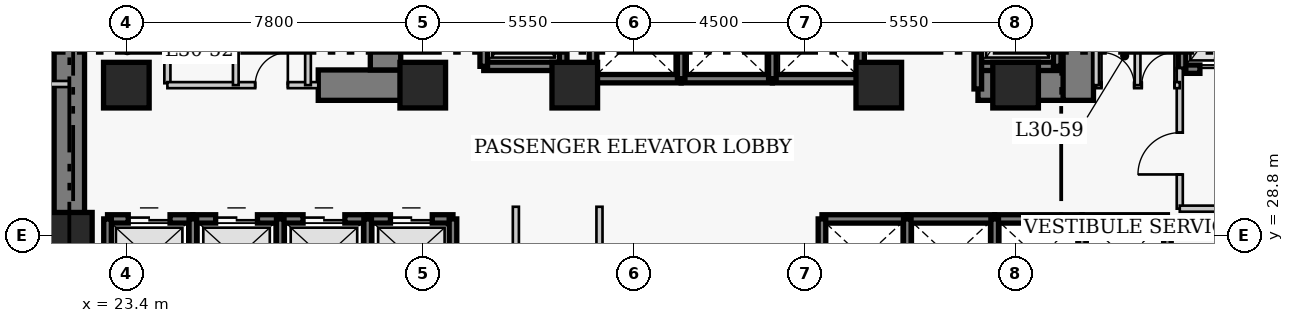
"""IFC4 building model, lengths in metres.
Left out: names, types, materials, properties, quantities, classifications, styles, units other than length and angle.
Written with IfcOpenShell. Run it as: python <this file> out.ifc"""

import sys

from ifc_helpers import new_model, si_unit, direction, frame, frame_2d, origin, origin_2d, place, context, subcontext, project, spatial, rectangle, extrude, element, fill, save


model = new_model("IFC4")
c1 = context("Model", 3, precision=1e-05, world=origin(), true_north=direction((0.0, 1.0)))
c2 = subcontext(c1, "Body", "Model", "MODEL_VIEW")
j1 = project(units=[si_unit("LENGTHUNIT", "METRE"), si_unit("PLANEANGLEUNIT", "RADIAN")], contexts=[c1])
p1 = place(None, origin())
s1 = spatial("IfcSite", under=j1, at=p1, CompositionType="ELEMENT")
p2 = place(p1, origin())
s2 = spatial("IfcBuilding", under=s1, at=p2, CompositionType="ELEMENT")
p3 = place(p2, frame((0.0, 0.0, 122.2)))
s3 = spatial("IfcBuildingStorey", under=s2, at=p3, CompositionType="ELEMENT", Elevation=122.2)
p4 = place(p3, frame((21.9, 27.05, 0.0), z_axis=(0.0, 0.0, 1.0), x_axis=(0.0, 1.0, 0.0)))
e1 = element("IfcWall", 1, at=p4, inside=s3, PredefinedType="SHEAR", context=c2, shape_type="SweptSolid", body=[
    extrude(rectangle(XDim=13.67, YDim=0.8, at=frame_2d((6.835, 0.0))), origin(), (0.0, 0.0, 1.0), 3.8),
])
p5 = place(p3, frame((28.45, 32.75, 0.0), z_axis=(0.0, 0.0, 1.0), x_axis=(1.0, 0.0, 0.0)))
e2 = element("IfcWall", 2, at=p5, inside=s3, PredefinedType="SHEAR", context=c2, shape_type="SweptSolid", body=[
    extrude(rectangle(XDim=2.4, YDim=0.8, at=frame_2d((1.2, 0.0))), origin(), (0.0, 0.0, 1.0), 3.8),
])
p6 = place(p3, frame((45.81, 32.75, 0.0), z_axis=(0.0, 0.0, 1.0), x_axis=(1.0, 0.0, 0.0)))
e3 = element("IfcWall", 3, at=p6, inside=s3, PredefinedType="SHEAR", context=c2, shape_type="SweptSolid", body=[
    extrude(rectangle(XDim=2.64, YDim=0.8, at=frame_2d((1.32, 0.0))), origin(), (0.0, 0.0, 1.0), 3.8),
])
p7 = place(p3, frame((30.22, 33.15, 0.0), z_axis=(0.0, 0.0, 1.0), x_axis=(0.0, 1.0, 0.0)))
e4 = element("IfcWall", 4, at=p7, inside=s3, PredefinedType="SHEAR", context=c2, shape_type="SweptSolid", body=[
    extrude(rectangle(XDim=7.17, YDim=0.8, at=frame_2d((3.585, 0.0))), origin(), (0.0, 0.0, 1.0), 3.8),
])
p8 = place(p3, frame((48.45, 32.35, 0.0), z_axis=(0.0, 0.0, 1.0), x_axis=(0.0, 1.0, 0.0)))
e5 = element("IfcWall", 5, at=p8, inside=s3, PredefinedType="SHEAR", context=c2, shape_type="SweptSolid", body=[
    extrude(rectangle(XDim=7.97, YDim=0.8, at=frame_2d((3.985, 0.0))), origin(), (0.0, 0.0, 1.0), 3.8),
])
p9 = place(p8, frame((5.85, 0.0, 0.0)))
e6 = element("IfcOpeningElement", 6, at=p9, cuts=e5, PredefinedType="OPENING", context=c2, shape_type="SweptSolid", body=[
    extrude(rectangle(XDim=1.1, YDim=2.15, at=frame_2d((0.55, 1.075))), frame((0.0, 0.41, 0.0), z_axis=(0.0, -1.0, 0.0), x_axis=(1.0, 0.0, 0.0)), (0.0, 0.0, 1.0), 0.82),
])
for number, where, z_axis, x_axis in (
    (7, (21.9, 28.8, 0.0), (0.0, 0.0, 1.0), (1.0, 0.0, 0.0)),
    (8, (23.4, 32.75, 0.0), (0.0, 0.0, 1.0), (1.0, 0.0, 0.0)),
    (9, (31.2, 32.75, 0.0), (0.0, 0.0, 1.0), (1.0, 0.0, 0.0)),
    (10, (35.2, 32.75, 0.0), (0.0, 0.0, 1.0), (1.0, 0.0, 0.0)),
    (11, (43.2, 32.75, 0.0), (0.0, 0.0, 1.0), (1.0, 0.0, 0.0)),
    (12, (46.8, 32.75, 0.0), (0.0, 0.0, 1.0), (1.0, 0.0, 0.0)),
):
    element("IfcColumn", number, at=place(p3, frame(where, z_axis=z_axis, x_axis=x_axis)), inside=s3, PredefinedType="COLUMN", context=c2, shape_type="SweptSolid", body=[
        extrude(rectangle(XDim=1.2, YDim=1.2, at=origin_2d()), origin(), (0.0, 0.0, 1.0), 3.8),
    ])
p10 = place(p3, frame((22.905, 29.23, 0.0), z_axis=(0.0, 0.0, 1.0), x_axis=(1.0, 0.0, 0.0)))
e13 = element("IfcWall", 13, at=p10, inside=s3, PredefinedType="SHEAR", context=c2, shape_type="SweptSolid", body=[
    extrude(rectangle(XDim=2.245, YDim=0.22, at=frame_2d((1.123, 0.0))), origin(), (0.0, 0.0, 1.0), 3.8),
])
p11 = place(p10, frame((0.545, 0.0, 0.0)))
e14 = element("IfcOpeningElement", 14, at=p11, cuts=e13, PredefinedType="OPENING", context=c2, shape_type="SweptSolid", body=[
    extrude(rectangle(XDim=1.1, YDim=2.15, at=frame_2d((0.55, 1.075))), frame((0.0, 0.12, 0.0), z_axis=(0.0, -1.0, 0.0), x_axis=(1.0, 0.0, 0.0)), (0.0, 0.0, 1.0), 0.24),
])
p12 = place(p3, frame((22.905, 27.17, 0.0), z_axis=(0.0, 0.0, 1.0), x_axis=(0.0, 1.0, 0.0)))
e15 = element("IfcWall", 15, at=p12, inside=s3, PredefinedType="SHEAR", context=c2, shape_type="SweptSolid", body=[
    extrude(rectangle(XDim=2.06, YDim=0.2, at=frame_2d((1.03, 0.0))), origin(), (0.0, 0.0, 1.0), 3.8),
])
p13 = place(p3, frame((25.15, 29.23, 0.0), z_axis=(0.0, 0.0, 1.0), x_axis=(1.0, 0.0, 0.0)))
e16 = element("IfcWall", 16, at=p13, inside=s3, PredefinedType="SHEAR", context=c2, shape_type="SweptSolid", body=[
    extrude(rectangle(XDim=2.3, YDim=0.22, at=frame_2d((1.15, 0.0))), origin(), (0.0, 0.0, 1.0), 3.8),
])
p14 = place(p13, frame((0.6, 0.0, 0.0)))
e17 = element("IfcOpeningElement", 17, at=p14, cuts=e16, PredefinedType="OPENING", context=c2, shape_type="SweptSolid", body=[
    extrude(rectangle(XDim=1.1, YDim=2.15, at=frame_2d((0.55, 1.075))), frame((0.0, 0.12, 0.0), z_axis=(0.0, -1.0, 0.0), x_axis=(1.0, 0.0, 0.0)), (0.0, 0.0, 1.0), 0.24),
])
p15 = place(p3, frame((25.15, 27.17, 0.0), z_axis=(0.0, 0.0, 1.0), x_axis=(0.0, 1.0, 0.0)))
e18 = element("IfcWall", 18, at=p15, inside=s3, PredefinedType="SHEAR", context=c2, shape_type="SweptSolid", body=[
    extrude(rectangle(XDim=2.06, YDim=0.2, at=frame_2d((1.03, 0.0))), origin(), (0.0, 0.0, 1.0), 3.8),
])
p16 = place(p3, frame((27.45, 29.23, 0.0), z_axis=(0.0, 0.0, 1.0), x_axis=(1.0, 0.0, 0.0)))
e19 = element("IfcWall", 19, at=p16, inside=s3, PredefinedType="SHEAR", context=c2, shape_type="SweptSolid", body=[
    extrude(rectangle(XDim=2.3, YDim=0.22, at=frame_2d((1.15, 0.0))), origin(), (0.0, 0.0, 1.0), 3.8),
])
p17 = place(p16, frame((0.6, 0.0, 0.0)))
e20 = element("IfcOpeningElement", 20, at=p17, cuts=e19, PredefinedType="OPENING", context=c2, shape_type="SweptSolid", body=[
    extrude(rectangle(XDim=1.1, YDim=2.15, at=frame_2d((0.55, 1.075))), frame((0.0, 0.12, 0.0), z_axis=(0.0, -1.0, 0.0), x_axis=(1.0, 0.0, 0.0)), (0.0, 0.0, 1.0), 0.24),
])
p18 = place(p3, frame((27.45, 27.17, 0.0), z_axis=(0.0, 0.0, 1.0), x_axis=(0.0, 1.0, 0.0)))
e21 = element("IfcWall", 21, at=p18, inside=s3, PredefinedType="SHEAR", context=c2, shape_type="SweptSolid", body=[
    extrude(rectangle(XDim=2.06, YDim=0.2, at=frame_2d((1.03, 0.0))), origin(), (0.0, 0.0, 1.0), 3.8),
])
p19 = place(p3, frame((29.75, 29.23, 0.0), z_axis=(0.0, 0.0, 1.0), x_axis=(1.0, 0.0, 0.0)))
e22 = element("IfcWall", 22, at=p19, inside=s3, PredefinedType="SHEAR", context=c2, shape_type="SweptSolid", body=[
    extrude(rectangle(XDim=2.245, YDim=0.22, at=frame_2d((1.123, 0.0))), origin(), (0.0, 0.0, 1.0), 3.8),
])
p20 = place(p19, frame((0.6, 0.0, 0.0)))
e23 = element("IfcOpeningElement", 23, at=p20, cuts=e22, PredefinedType="OPENING", context=c2, shape_type="SweptSolid", body=[
    extrude(rectangle(XDim=1.1, YDim=2.15, at=frame_2d((0.55, 1.075))), frame((0.0, 0.12, 0.0), z_axis=(0.0, -1.0, 0.0), x_axis=(1.0, 0.0, 0.0)), (0.0, 0.0, 1.0), 0.24),
])
for number, where, z_axis, x_axis in (
    (24, (29.75, 27.17, 0.0), (0.0, 0.0, 1.0), (0.0, 1.0, 0.0)),
    (25, (31.995, 27.17, 0.0), (0.0, 0.0, 1.0), (0.0, 1.0, 0.0)),
):
    element("IfcWall", number, at=place(p3, frame(where, z_axis=z_axis, x_axis=x_axis)), inside=s3, PredefinedType="SHEAR", context=c2, shape_type="SweptSolid", body=[
        extrude(rectangle(XDim=2.06, YDim=0.2, at=frame_2d((1.03, 0.0))), origin(), (0.0, 0.0, 1.0), 3.8),
    ])
p21 = place(p3, frame((41.705, 29.23, 0.0), z_axis=(0.0, 0.0, 1.0), x_axis=(1.0, 0.0, 0.0)))
e26 = element("IfcWall", 26, at=p21, inside=s3, PredefinedType="SHEAR", context=c2, shape_type="SweptSolid", body=[
    extrude(rectangle(XDim=2.245, YDim=0.22, at=frame_2d((1.123, 0.0))), origin(), (0.0, 0.0, 1.0), 3.8),
])
p22 = place(p3, frame((41.705, 27.17, 0.0), z_axis=(0.0, 0.0, 1.0), x_axis=(0.0, 1.0, 0.0)))
e27 = element("IfcWall", 27, at=p22, inside=s3, PredefinedType="SHEAR", context=c2, shape_type="SweptSolid", body=[
    extrude(rectangle(XDim=2.06, YDim=0.2, at=frame_2d((1.03, 0.0))), origin(), (0.0, 0.0, 1.0), 3.8),
])
p23 = place(p3, frame((43.95, 29.23, 0.0), z_axis=(0.0, 0.0, 1.0), x_axis=(1.0, 0.0, 0.0)))
e28 = element("IfcWall", 28, at=p23, inside=s3, PredefinedType="SHEAR", context=c2, shape_type="SweptSolid", body=[
    extrude(rectangle(XDim=2.3, YDim=0.22, at=frame_2d((1.15, 0.0))), origin(), (0.0, 0.0, 1.0), 3.8),
])
p24 = place(p3, frame((43.95, 27.17, 0.0), z_axis=(0.0, 0.0, 1.0), x_axis=(0.0, 1.0, 0.0)))
e29 = element("IfcWall", 29, at=p24, inside=s3, PredefinedType="SHEAR", context=c2, shape_type="SweptSolid", body=[
    extrude(rectangle(XDim=2.06, YDim=0.2, at=frame_2d((1.03, 0.0))), origin(), (0.0, 0.0, 1.0), 3.8),
])
p25 = place(p3, frame((46.25, 29.23, 0.0), z_axis=(0.0, 0.0, 1.0), x_axis=(1.0, 0.0, 0.0)))
e30 = element("IfcWall", 30, at=p25, inside=s3, PredefinedType="SHEAR", context=c2, shape_type="SweptSolid", body=[
    extrude(rectangle(XDim=2.3, YDim=0.22, at=frame_2d((1.15, 0.0))), origin(), (0.0, 0.0, 1.0), 3.8),
])
p26 = place(p3, frame((46.25, 27.17, 0.0), z_axis=(0.0, 0.0, 1.0), x_axis=(0.0, 1.0, 0.0)))
e31 = element("IfcWall", 31, at=p26, inside=s3, PredefinedType="SHEAR", context=c2, shape_type="SweptSolid", body=[
    extrude(rectangle(XDim=2.06, YDim=0.2, at=frame_2d((1.03, 0.0))), origin(), (0.0, 0.0, 1.0), 3.8),
])
p27 = place(p3, frame((48.55, 29.23, 0.0), z_axis=(0.0, 0.0, 1.0), x_axis=(1.0, 0.0, 0.0)))
e32 = element("IfcWall", 32, at=p27, inside=s3, PredefinedType="SHEAR", context=c2, shape_type="SweptSolid", body=[
    extrude(rectangle(XDim=2.245, YDim=0.22, at=frame_2d((1.123, 0.0))), origin(), (0.0, 0.0, 1.0), 3.8),
])
for number, where, z_axis, x_axis in (
    (33, (48.55, 27.17, 0.0), (0.0, 0.0, 1.0), (0.0, 1.0, 0.0)),
    (34, (50.795, 27.17, 0.0), (0.0, 0.0, 1.0), (0.0, 1.0, 0.0)),
):
    element("IfcWall", number, at=place(p3, frame(where, z_axis=z_axis, x_axis=x_axis)), inside=s3, PredefinedType="SHEAR", context=c2, shape_type="SweptSolid", body=[
        extrude(rectangle(XDim=2.06, YDim=0.2, at=frame_2d((1.03, 0.0))), origin(), (0.0, 0.0, 1.0), 3.8),
    ])
p28 = place(p3, frame((35.68, 32.92, 0.0), z_axis=(0.0, 0.0, 1.0), x_axis=(1.0, 0.0, 0.0)))
e35 = element("IfcWall", 35, at=p28, inside=s3, PredefinedType="SHEAR", context=c2, shape_type="SweptSolid", body=[
    extrude(rectangle(XDim=2.32, YDim=0.22, at=frame_2d((1.16, 0.0))), origin(), (0.0, 0.0, 1.0), 3.8),
])
p29 = place(p3, frame((35.68, 32.92, 0.0), z_axis=(0.0, 0.0, 1.0), x_axis=(0.0, 1.0, 0.0)))
e36 = element("IfcWall", 36, at=p29, inside=s3, PredefinedType="SHEAR", context=c2, shape_type="SweptSolid", body=[
    extrude(rectangle(XDim=2.16, YDim=0.2, at=frame_2d((1.08, 0.0))), origin(), (0.0, 0.0, 1.0), 3.8),
])
p30 = place(p3, frame((38.0, 32.92, 0.0), z_axis=(0.0, 0.0, 1.0), x_axis=(1.0, 0.0, 0.0)))
e37 = element("IfcWall", 37, at=p30, inside=s3, PredefinedType="SHEAR", context=c2, shape_type="SweptSolid", body=[
    extrude(rectangle(XDim=2.4, YDim=0.22, at=frame_2d((1.2, 0.0))), origin(), (0.0, 0.0, 1.0), 3.8),
])
p31 = place(p3, frame((38.0, 32.92, 0.0), z_axis=(0.0, 0.0, 1.0), x_axis=(0.0, 1.0, 0.0)))
e38 = element("IfcWall", 38, at=p31, inside=s3, PredefinedType="SHEAR", context=c2, shape_type="SweptSolid", body=[
    extrude(rectangle(XDim=2.16, YDim=0.2, at=frame_2d((1.08, 0.0))), origin(), (0.0, 0.0, 1.0), 3.8),
])
p32 = place(p3, frame((40.4, 32.92, 0.0), z_axis=(0.0, 0.0, 1.0), x_axis=(1.0, 0.0, 0.0)))
e39 = element("IfcWall", 39, at=p32, inside=s3, PredefinedType="SHEAR", context=c2, shape_type="SweptSolid", body=[
    extrude(rectangle(XDim=2.32, YDim=0.22, at=frame_2d((1.16, 0.0))), origin(), (0.0, 0.0, 1.0), 3.8),
])
for number, where, z_axis, x_axis in (
    (40, (40.4, 32.92, 0.0), (0.0, 0.0, 1.0), (0.0, 1.0, 0.0)),
    (41, (42.72, 32.92, 0.0), (0.0, 0.0, 1.0), (0.0, 1.0, 0.0)),
):
    element("IfcWall", number, at=place(p3, frame(where, z_axis=z_axis, x_axis=x_axis)), inside=s3, PredefinedType="SHEAR", context=c2, shape_type="SweptSolid", body=[
        extrude(rectangle(XDim=2.16, YDim=0.2, at=frame_2d((1.08, 0.0))), origin(), (0.0, 0.0, 1.0), 3.8),
    ])
p33 = place(p3, frame((51.18, 33.17, 0.0), z_axis=(0.0, 0.0, 1.0), x_axis=(1.0, 0.0, 0.0)))
e42 = element("IfcWall", 42, at=p33, inside=s3, PredefinedType="SHEAR", context=c2, shape_type="SweptSolid", body=[
    extrude(rectangle(XDim=2.42, YDim=0.22, at=frame_2d((1.21, 0.0))), origin(), (0.0, 0.0, 1.0), 3.8),
])
p34 = place(p33, frame((0.47, 0.0, 0.0)))
e43 = element("IfcOpeningElement", 43, at=p34, cuts=e42, PredefinedType="OPENING", context=c2, shape_type="SweptSolid", body=[
    extrude(rectangle(XDim=1.3, YDim=2.15, at=frame_2d((0.65, 1.075))), frame((0.0, 0.12, 0.0), z_axis=(0.0, -1.0, 0.0), x_axis=(1.0, 0.0, 0.0)), (0.0, 0.0, 1.0), 0.24),
])
p35 = place(p3, frame((51.18, 33.17, 0.0), z_axis=(0.0, 0.0, 1.0), x_axis=(0.0, 1.0, 0.0)))
e44 = element("IfcWall", 44, at=p35, inside=s3, PredefinedType="SHEAR", context=c2, shape_type="SweptSolid", body=[
    extrude(rectangle(XDim=2.86, YDim=0.2, at=frame_2d((1.43, 0.0))), origin(), (0.0, 0.0, 1.0), 3.8),
])
p36 = place(p3, frame((32.805, 33.245, 0.0), z_axis=(0.0, 0.0, 1.0), x_axis=(1.0, 0.0, 0.0)))
e45 = element("IfcWall", 45, at=p36, inside=s3, PredefinedType="SHEAR", context=c2, shape_type="SweptSolid", body=[
    extrude(rectangle(XDim=2.09, YDim=0.22, at=frame_2d((1.045, 0.0))), origin(), (0.0, 0.0, 1.0), 3.8),
])
for number, where, z_axis, x_axis in (
    (46, (32.805, 33.245, 0.0), (0.0, 0.0, 1.0), (0.0, 1.0, 0.0)),
    (47, (34.895, 33.245, 0.0), (0.0, 0.0, 1.0), (0.0, 1.0, 0.0)),
):
    element("IfcWall", number, at=place(p3, frame(where, z_axis=z_axis, x_axis=x_axis)), inside=s3, PredefinedType="SHEAR", context=c2, shape_type="SweptSolid", body=[
        extrude(rectangle(XDim=2.91, YDim=0.2, at=frame_2d((1.455, 0.0))), origin(), (0.0, 0.0, 1.0), 3.8),
    ])
p37 = place(p3, frame((45.805, 33.245, 0.0), z_axis=(0.0, 0.0, 1.0), x_axis=(1.0, 0.0, 0.0)))
e48 = element("IfcWall", 48, at=p37, inside=s3, PredefinedType="SHEAR", context=c2, shape_type="SweptSolid", body=[
    extrude(rectangle(XDim=2.09, YDim=0.22, at=frame_2d((1.045, 0.0))), origin(), (0.0, 0.0, 1.0), 3.8),
])
p38 = place(p3, frame((45.805, 32.65, 0.0), z_axis=(0.0, 0.0, 1.0), x_axis=(0.0, 1.0, 0.0)))
e49 = element("IfcWall", 49, at=p38, inside=s3, PredefinedType="SHEAR", context=c2, shape_type="SweptSolid", body=[
    extrude(rectangle(XDim=3.505, YDim=0.2, at=frame_2d((1.752, 0.0))), origin(), (0.0, 0.0, 1.0), 3.8),
])
p39 = place(p3, frame((47.895, 33.245, 0.0), z_axis=(0.0, 0.0, 1.0), x_axis=(0.0, 1.0, 0.0)))
e50 = element("IfcWall", 50, at=p39, inside=s3, PredefinedType="SHEAR", context=c2, shape_type="SweptSolid", body=[
    extrude(rectangle(XDim=2.91, YDim=0.2, at=frame_2d((1.455, 0.0))), origin(), (0.0, 0.0, 1.0), 3.8),
])
p40 = place(p3, frame((24.48, 32.8, 0.0), z_axis=(0.0, 0.0, 1.0), x_axis=(0.0, 1.0, 0.0)))
e51 = element("IfcWall", 51, at=p40, inside=s3, PredefinedType="PARTITIONING", context=c2, shape_type="SweptSolid", body=[
    extrude(rectangle(XDim=3.57, YDim=0.16, at=frame_2d((1.785, 0.0))), origin(), (0.0, 0.0, 1.0), 3.54),
])
p41 = place(p40, frame((1.604, 0.0, 0.0)))
e52 = element("IfcOpeningElement", 52, at=p41, cuts=e51, PredefinedType="OPENING", context=c2, shape_type="SweptSolid", body=[
    extrude(rectangle(XDim=0.9, YDim=2.1, at=frame_2d((0.45, 1.05))), frame((0.0, 0.09, 0.0), z_axis=(0.0, -1.0, 0.0), x_axis=(1.0, 0.0, 0.0)), (0.0, 0.0, 1.0), 0.18),
])
p42 = place(p3, frame((51.12, 29.5, 0.0), z_axis=(0.0, 0.0, 1.0), x_axis=(0.0, 1.0, 0.0)))
e53 = element("IfcWall", 53, at=p42, inside=s3, PredefinedType="PARTITIONING", context=c2, shape_type="SweptSolid", body=[
    extrude(rectangle(XDim=3.7, YDim=0.16, at=frame_2d((1.85, 0.0))), origin(), (0.0, 0.0, 1.0), 3.54),
])
p43 = place(p42, frame((0.9, 0.0, 0.0)))
e54 = element("IfcOpeningElement", 54, at=p43, cuts=e53, PredefinedType="OPENING", context=c2, shape_type="SweptSolid", body=[
    extrude(rectangle(XDim=1.1, YDim=2.15, at=frame_2d((0.55, 1.075))), frame((0.0, 0.09, 0.0), z_axis=(0.0, -1.0, 0.0), x_axis=(1.0, 0.0, 0.0)), (0.0, 0.0, 1.0), 0.18),
])
p44 = place(p3, frame((51.12, 29.5, 0.0), z_axis=(0.0, 0.0, 1.0), x_axis=(1.0, 0.0, 0.0)))
e55 = element("IfcWall", 55, at=p44, inside=s3, PredefinedType="PARTITIONING", context=c2, shape_type="SweptSolid", body=[
    extrude(rectangle(XDim=5.63, YDim=0.16, at=frame_2d((2.815, 0.0))), origin(), (0.0, 0.0, 1.0), 3.54),
])
p45 = place(p3, frame((24.48, 32.75, 0.0), z_axis=(0.0, 0.0, 1.0), x_axis=(1.0, 0.0, 0.0)))
e56 = element("IfcWall", 56, at=p45, inside=s3, PredefinedType="PARTITIONING", context=c2, shape_type="SweptSolid", body=[
    extrude(rectangle(XDim=3.97, YDim=0.16, at=frame_2d((1.985, 0.0))), origin(), (0.0, 0.0, 1.0), 3.54),
])
p46 = place(p45, frame((2.31, 0.0, 0.0)))
e57 = element("IfcOpeningElement", 57, at=p46, cuts=e56, PredefinedType="OPENING", context=c2, shape_type="SweptSolid", body=[
    extrude(rectangle(XDim=0.86, YDim=2.05, at=frame_2d((0.43, 1.025))), frame((0.0, 0.09, 0.0), z_axis=(0.0, -1.0, 0.0), x_axis=(1.0, 0.0, 0.0)), (0.0, 0.0, 1.0), 0.18),
])
p47 = place(p3, frame((48.92, 32.75, 0.0), z_axis=(0.0, 0.0, 1.0), x_axis=(1.0, 0.0, 0.0)))
e58 = element("IfcWall", 58, at=p47, inside=s3, PredefinedType="PARTITIONING", context=c2, shape_type="SweptSolid", body=[
    extrude(rectangle(XDim=2.2, YDim=0.16, at=frame_2d((1.1, 0.0))), origin(), (0.0, 0.0, 1.0), 3.54),
])
p48 = place(p47, frame((0.14, 0.0, 0.0)))
e59 = element("IfcOpeningElement", 59, at=p48, cuts=e58, PredefinedType="OPENING", context=c2, shape_type="SweptSolid", body=[
    extrude(rectangle(XDim=0.86, YDim=2.05, at=frame_2d((0.43, 1.025))), frame((0.0, 0.09, 0.0), z_axis=(0.0, -1.0, 0.0), x_axis=(1.0, 0.0, 0.0)), (0.0, 0.0, 1.0), 0.18),
])
p49 = place(p47, frame((1.2, 0.0, 0.0)))
e60 = element("IfcOpeningElement", 60, at=p49, cuts=e58, PredefinedType="OPENING", context=c2, shape_type="SweptSolid", body=[
    extrude(rectangle(XDim=0.86, YDim=2.05, at=frame_2d((0.43, 1.025))), frame((0.0, 0.09, 0.0), z_axis=(0.0, -1.0, 0.0), x_axis=(1.0, 0.0, 0.0)), (0.0, 0.0, 1.0), 0.18),
])
for number, where, z_axis, x_axis in (
    (61, (48.92, 32.75, 0.0), (0.0, 0.0, 1.0), (0.0, 1.0, 0.0)),
    (62, (26.28, 32.75, 0.0), (0.0, 0.0, 1.0), (0.0, 1.0, 0.0)),
    (63, (28.18, 32.75, 0.0), (0.0, 0.0, 1.0), (0.0, 1.0, 0.0)),
    (64, (50.01, 32.75, 0.0), (0.0, 0.0, 1.0), (0.0, 1.0, 0.0)),
):
    element("IfcWall", number, at=place(p3, frame(where, z_axis=z_axis, x_axis=x_axis)), inside=s3, PredefinedType="PARTITIONING", context=c2, shape_type="SweptSolid", body=[
        extrude(rectangle(XDim=3.62, YDim=0.15, at=frame_2d((1.81, 0.0))), origin(), (0.0, 0.0, 1.0), 3.54),
    ])
for number, where, z_axis, x_axis in (
    (65, (33.65, 25.11, 0.0), (0.0, 0.0, 1.0), (0.0, 1.0, 0.0)),
    (66, (35.85, 25.11, 0.0), (0.0, 0.0, 1.0), (0.0, 1.0, 0.0)),
):
    element("IfcWall", number, at=place(p3, frame(where, z_axis=z_axis, x_axis=x_axis)), inside=s3, PredefinedType="PARTITIONING", context=c2, shape_type="SweptSolid", body=[
        extrude(rectangle(XDim=4.44, YDim=0.16, at=frame_2d((2.22, 0.0))), origin(), (0.0, 0.0, 1.0), 3.54),
    ])
p50 = place(p3, frame((20.46, 32.78, 0.0), z_axis=(0.0, 0.0, 1.0), x_axis=(1.0, 0.0, 0.0)))
e67 = element("IfcWall", 67, at=p50, inside=s3, PredefinedType="PARTITIONING", context=c2, shape_type="SweptSolid", body=[
    extrude(rectangle(XDim=1.44, YDim=0.16, at=frame_2d((0.72, 0.0))), origin(), (0.0, 0.0, 1.0), 3.54),
])
p51 = place(p11, origin())
e68 = element("IfcDoor", 68, at=p51, inside=s3, OperationType="DOUBLE_DOOR_SLIDING", PredefinedType="DOOR", context=c2, shape_type="SweptSolid", body=[
    extrude(rectangle(XDim=1.1, YDim=2.15, at=frame_2d((0.55, 1.075))), frame((0.0, 0.025, 0.0), z_axis=(0.0, -1.0, 0.0), x_axis=(1.0, 0.0, 0.0)), (0.0, 0.0, 1.0), 0.05),
])
fill(e14, e68)
p52 = place(p14, origin())
e69 = element("IfcDoor", 69, at=p52, inside=s3, OperationType="DOUBLE_DOOR_SLIDING", PredefinedType="DOOR", context=c2, shape_type="SweptSolid", body=[
    extrude(rectangle(XDim=1.1, YDim=2.15, at=frame_2d((0.55, 1.075))), frame((0.0, 0.025, 0.0), z_axis=(0.0, -1.0, 0.0), x_axis=(1.0, 0.0, 0.0)), (0.0, 0.0, 1.0), 0.05),
])
fill(e17, e69)
p53 = place(p17, origin())
e70 = element("IfcDoor", 70, at=p53, inside=s3, OperationType="DOUBLE_DOOR_SLIDING", PredefinedType="DOOR", context=c2, shape_type="SweptSolid", body=[
    extrude(rectangle(XDim=1.1, YDim=2.15, at=frame_2d((0.55, 1.075))), frame((0.0, 0.025, 0.0), z_axis=(0.0, -1.0, 0.0), x_axis=(1.0, 0.0, 0.0)), (0.0, 0.0, 1.0), 0.05),
])
fill(e20, e70)
p54 = place(p20, origin())
e71 = element("IfcDoor", 71, at=p54, inside=s3, OperationType="DOUBLE_DOOR_SLIDING", PredefinedType="DOOR", context=c2, shape_type="SweptSolid", body=[
    extrude(rectangle(XDim=1.1, YDim=2.15, at=frame_2d((0.55, 1.075))), frame((0.0, 0.025, 0.0), z_axis=(0.0, -1.0, 0.0), x_axis=(1.0, 0.0, 0.0)), (0.0, 0.0, 1.0), 0.05),
])
fill(e23, e71)
p55 = place(p34, origin())
e72 = element("IfcDoor", 72, at=p55, inside=s3, OperationType="DOUBLE_DOOR_SLIDING", PredefinedType="DOOR", context=c2, shape_type="SweptSolid", body=[
    extrude(rectangle(XDim=1.3, YDim=2.15, at=frame_2d((0.65, 1.075))), frame((0.0, 0.025, 0.0), z_axis=(0.0, -1.0, 0.0), x_axis=(1.0, 0.0, 0.0)), (0.0, 0.0, 1.0), 0.05),
])
fill(e43, e72)
p56 = place(p43, origin())
e73 = element("IfcDoor", 73, at=p56, inside=s3, OperationType="SINGLE_SWING_LEFT", PredefinedType="DOOR", context=c2, shape_type="SweptSolid", body=[
    extrude(rectangle(XDim=1.1, YDim=2.15, at=frame_2d((0.55, 1.075))), frame((0.0, 0.025, 0.0), z_axis=(0.0, -1.0, 0.0), x_axis=(1.0, 0.0, 0.0)), (0.0, 0.0, 1.0), 0.05),
])
fill(e54, e73)
p57 = place(p46, origin())
e74 = element("IfcDoor", 74, at=p57, inside=s3, OperationType="SINGLE_SWING_RIGHT", PredefinedType="DOOR", context=c2, shape_type="SweptSolid", body=[
    extrude(rectangle(XDim=0.86, YDim=2.05, at=frame_2d((0.43, 1.025))), frame((0.0, 0.025, 0.0), z_axis=(0.0, -1.0, 0.0), x_axis=(1.0, 0.0, 0.0)), (0.0, 0.0, 1.0), 0.05),
])
fill(e57, e74)
p58 = place(p48, origin())
e75 = element("IfcDoor", 75, at=p58, inside=s3, OperationType="SINGLE_SWING_LEFT", PredefinedType="DOOR", context=c2, shape_type="SweptSolid", body=[
    extrude(rectangle(XDim=0.86, YDim=2.05, at=frame_2d((0.43, 1.025))), frame((0.0, 0.025, 0.0), z_axis=(0.0, -1.0, 0.0), x_axis=(1.0, 0.0, 0.0)), (0.0, 0.0, 1.0), 0.05),
])
fill(e59, e75)
p59 = place(p49, origin())
e76 = element("IfcDoor", 76, at=p59, inside=s3, OperationType="SINGLE_SWING_RIGHT", PredefinedType="DOOR", context=c2, shape_type="SweptSolid", body=[
    extrude(rectangle(XDim=0.86, YDim=2.05, at=frame_2d((0.43, 1.025))), frame((0.0, 0.025, 0.0), z_axis=(0.0, -1.0, 0.0), x_axis=(1.0, 0.0, 0.0)), (0.0, 0.0, 1.0), 0.05),
])
fill(e60, e76)
save(model, sys.argv[1])
